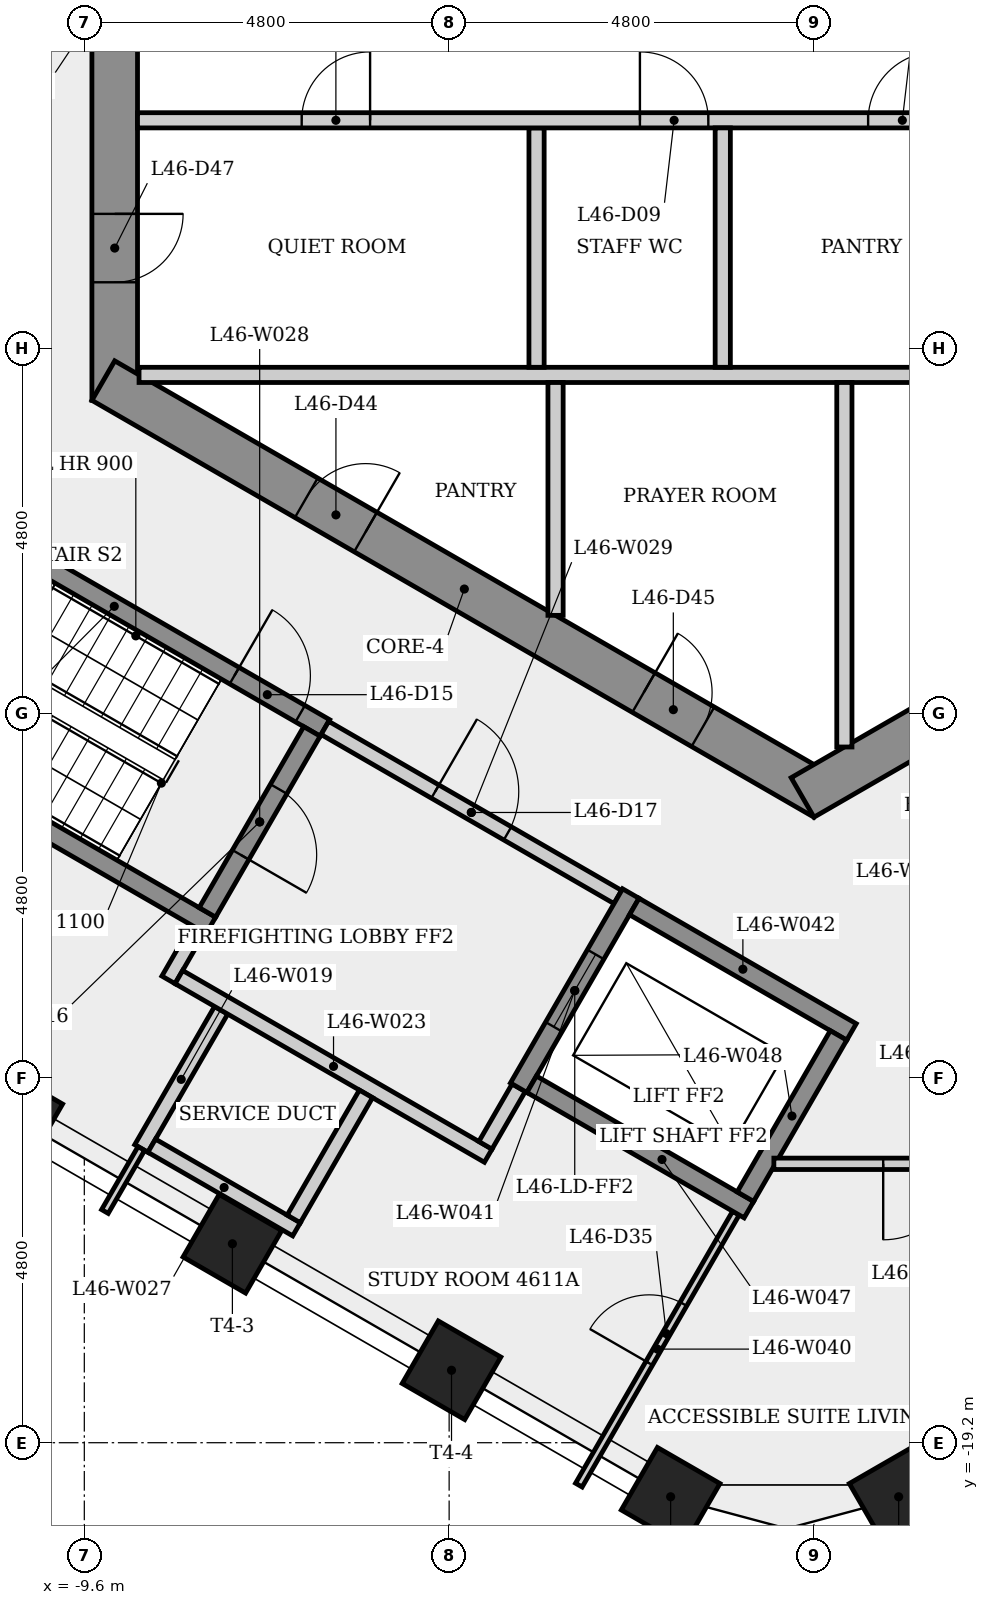
"""IFC4 building model, lengths in metres.
Left out: names, types, materials, properties, quantities, classifications, styles, units other than length and angle.
Written with IfcOpenShell. Run it as: python <this file> out.ifc"""

import sys

from ifc_helpers import new_model, si_unit, direction, frame, frame_2d, origin, origin_2d, place, context, subcontext, project, spatial, rectangle, extrude, element, fill, save


model = new_model("IFC4")
c1 = context("Model", 3, precision=1e-05, world=origin(), true_north=direction((0.0, 1.0)))
c2 = subcontext(c1, "Body", "Model", "MODEL_VIEW")
j1 = project(units=[si_unit("LENGTHUNIT", "METRE"), si_unit("PLANEANGLEUNIT", "RADIAN")], contexts=[c1])
p1 = place(None, origin())
s1 = spatial("IfcSite", under=j1, at=p1, CompositionType="ELEMENT")
p2 = place(p1, origin())
s2 = spatial("IfcBuilding", under=s1, at=p2, CompositionType="ELEMENT")
p3 = place(p2, frame((0.0, 0.0, 173.1)))
s3 = spatial("IfcBuildingStorey", under=s2, at=p3, CompositionType="ELEMENT", Elevation=173.1)
p4 = place(p3, frame((-9.2, 5.485, 0.0), z_axis=(0.0, 0.0, 1.0), x_axis=(0.0, -1.0, 0.0)))
e1 = element("IfcWall", 1, at=p4, inside=s3, PredefinedType="SHEAR", context=c2, shape_type="SweptSolid", body=[
    extrude(rectangle(XDim=10.97, YDim=0.6, at=frame_2d((5.485, 0.0))), origin(), (0.0, 0.0, 1.0), 3.4),
])
p5 = place(p4, frame((8.516, 0.0, 0.0)))
e2 = element("IfcOpeningElement", 2, at=p5, cuts=e1, PredefinedType="OPENING", context=c2, shape_type="SweptSolid", body=[
    extrude(rectangle(XDim=0.9, YDim=2.1, at=frame_2d((0.45, 1.05))), frame((0.0, 0.31, 0.0), z_axis=(0.0, -1.0, 0.0), x_axis=(1.0, 0.0, 0.0)), (0.0, 0.0, 1.0), 0.62),
])
p6 = place(p4, frame((4.685, 0.0, 0.0)))
e3 = element("IfcOpeningElement", 3, at=p6, cuts=e1, PredefinedType="OPENING", context=c2, shape_type="SweptSolid", body=[
    extrude(rectangle(XDim=1.6, YDim=2.1, at=frame_2d((0.8, 1.05))), frame((0.0, 0.31, 0.0), z_axis=(0.0, -1.0, 0.0), x_axis=(1.0, 0.0, 0.0)), (0.0, 0.0, 1.0), 0.62),
])
p7 = place(p3, frame((-9.35, -5.225, 0.0), z_axis=(0.0, 0.0, 1.0), x_axis=(0.866023993627, -0.500002442456, 0.0)))
e4 = element("IfcWall", 4, at=p7, inside=s3, PredefinedType="SHEAR", context=c2, shape_type="SweptSolid", body=[
    extrude(rectangle(XDim=10.97, YDim=0.6, at=frame_2d((5.485, 0.0))), origin(), (0.0, 0.0, 1.0), 3.4),
])
p8 = place(p7, frame((3.084, 0.0, 0.0)))
e5 = element("IfcOpeningElement", 5, at=p8, cuts=e4, PredefinedType="OPENING", context=c2, shape_type="SweptSolid", body=[
    extrude(rectangle(XDim=0.9, YDim=2.1, at=frame_2d((0.45, 1.05))), frame((0.0, 0.31, 0.0), z_axis=(0.0, -1.0, 0.0), x_axis=(1.0, 0.0, 0.0)), (0.0, 0.0, 1.0), 0.62),
])
p9 = place(p7, frame((8.21, 0.0, 0.0)))
e6 = element("IfcOpeningElement", 6, at=p9, cuts=e4, PredefinedType="OPENING", context=c2, shape_type="SweptSolid", body=[
    extrude(rectangle(XDim=0.9, YDim=2.1, at=frame_2d((0.45, 1.05))), frame((0.0, 0.31, 0.0), z_axis=(0.0, -1.0, 0.0), x_axis=(1.0, 0.0, 0.0)), (0.0, 0.0, 1.0), 0.62),
])
p10 = place(p3, frame((-0.15, -10.71, 0.0), z_axis=(0.0, 0.0, 1.0), x_axis=(0.866023993627, 0.500002442456, 0.0)))
e7 = element("IfcWall", 7, at=p10, inside=s3, PredefinedType="SHEAR", context=c2, shape_type="SweptSolid", body=[
    extrude(rectangle(XDim=10.97, YDim=0.6, at=frame_2d((5.485, 0.0))), origin(), (0.0, 0.0, 1.0), 3.4),
])
p11 = place(p10, frame((6.935, 0.0, 0.0)))
e8 = element("IfcOpeningElement", 8, at=p11, cuts=e7, PredefinedType="OPENING", context=c2, shape_type="SweptSolid", body=[
    extrude(rectangle(XDim=0.9, YDim=2.1, at=frame_2d((0.45, 1.05))), frame((0.0, 0.31, 0.0), z_axis=(0.0, -1.0, 0.0), x_axis=(1.0, 0.0, 0.0)), (0.0, 0.0, 1.0), 0.62),
])
for number, where, z_axis, x_axis in (
    (9, (-10.535, -14.918, 0.0), (0.0, 0.0, 1.0), (-0.5, -0.866, 0.0)),
    (10, (-7.652, -16.582, 0.0), (0.0, 0.0, 1.0), (-0.5, -0.866, 0.0)),
    (11, (-4.769, -18.247, 0.0), (0.0, 0.0, 1.0), (-0.5, -0.866, 0.0)),
    (12, (-1.886, -19.911, 0.0), (0.0, 0.0, 1.0), (-0.5, -0.866, 0.0)),
    (13, (1.114, -19.911, 0.0), (0.0, 0.0, 1.0), (0.5, -0.866, 0.0)),
):
    element("IfcColumn", number, at=place(p3, frame(where, z_axis=z_axis, x_axis=x_axis)), inside=s3, PredefinedType="COLUMN", context=c2, shape_type="SweptSolid", body=[
        extrude(rectangle(XDim=0.95, YDim=0.95, at=origin_2d()), origin(), (0.0, 0.0, 1.0), 3.4),
    ])
p12 = place(p3, frame((-11.977, -6.595, 0.0), z_axis=(0.0, 0.0, 1.0), x_axis=(0.866025499775, -0.499999833739, 0.0)))
e14 = element("IfcWall", 14, at=p12, inside=s3, PredefinedType="SHEAR", context=c2, shape_type="SweptSolid", body=[
    extrude(rectangle(XDim=6.4, YDim=0.25, at=frame_2d((3.2, 0.0))), origin(), (0.0, 0.0, 1.0), 3.05),
])
p13 = place(p12, frame((5.025, 0.0, 0.0)))
e15 = element("IfcOpeningElement", 15, at=p13, cuts=e14, PredefinedType="OPENING", context=c2, shape_type="SweptSolid", body=[
    extrude(rectangle(XDim=1.0, YDim=2.1, at=frame_2d((0.5, 1.05))), frame((0.0, 0.135, 0.0), z_axis=(0.0, -1.0, 0.0), x_axis=(1.0, 0.0, 0.0)), (0.0, 0.0, 1.0), 0.27),
])
p14 = place(p3, frame((-8.88, -5.15, 0.0), z_axis=(0.0, 0.0, 1.0), x_axis=(1.0, 0.0, 0.0)))
e16 = element("IfcWall", 16, at=p14, inside=s3, PredefinedType="PARTITIONING", context=c2, shape_type="SweptSolid", body=[
    extrude(rectangle(XDim=11.205, YDim=0.2, at=frame_2d((5.603, 0.0))), origin(), (0.0, 0.0, 1.0), 3.05),
])
p15 = place(p3, frame((-8.85, -15.329, 0.0), z_axis=(0.0, 0.0, 1.0), x_axis=(0.500027713859, 0.866009402589, 0.0)))
e17 = element("IfcWall", 17, at=p15, inside=s3, PredefinedType="PLUMBINGWALL", context=c2, shape_type="SweptSolid", body=[
    extrude(rectangle(XDim=2.1, YDim=0.2, at=frame_2d((1.05, 0.0))), origin(), (0.0, 0.0, 1.0), 3.05),
])
p16 = place(p3, frame((-8.493, -13.11, 0.0), z_axis=(0.0, 0.0, 1.0), x_axis=(0.500067724834, 0.865986299303, 0.0)))
e18 = element("IfcWall", 18, at=p16, inside=s3, PredefinedType="PARTITIONING", context=c2, shape_type="SweptSolid", body=[
    extrude(rectangle(XDim=0.775, YDim=0.2, at=frame_2d((0.388, 0.0))), origin(), (0.0, 0.0, 1.0), 3.05),
])
p17 = place(p3, frame((-7.935, -12.393, 0.0), z_axis=(0.0, 0.0, 1.0), x_axis=(-0.866025499775, 0.499999833739, 0.0)))
e19 = element("IfcWall", 19, at=p17, inside=s3, PredefinedType="SHEAR", context=c2, shape_type="SweptSolid", body=[
    extrude(rectangle(XDim=6.4, YDim=0.25, at=frame_2d((3.2, 0.0))), origin(), (0.0, 0.0, 1.0), 3.05),
])
p18 = place(p3, frame((-9.329, -16.158, 0.0), z_axis=(0.0, 0.0, 1.0), x_axis=(0.499950501706, 0.866053979752, 0.0)))
e20 = element("IfcWall", 20, at=p18, inside=s3, PredefinedType="PARTITIONING", context=c2, shape_type="SweptSolid", body=[
    extrude(rectangle(XDim=0.958, YDim=0.1, at=frame_2d((0.479, 0.0))), origin(), (0.0, 0.0, 1.0), 3.05),
])
p19 = place(p3, frame((-8.356, -13.073, 0.0), z_axis=(0.0, 0.0, 1.0), x_axis=(0.866038532462, -0.499977259774, 0.0)))
e21 = element("IfcWall", 21, at=p19, inside=s3, PredefinedType="PARTITIONING", context=c2, shape_type="SweptSolid", body=[
    extrude(rectangle(XDim=4.7, YDim=0.2, at=frame_2d((2.35, 0.0))), origin(), (0.0, 0.0, 1.0), 3.05),
])
p20 = place(p3, frame((-6.808, -16.392, 0.0), z_axis=(0.0, 0.0, 1.0), x_axis=(-0.866008176907, 0.50002983664, 0.0)))
e22 = element("IfcWall", 22, at=p20, inside=s3, PredefinedType="PLUMBINGWALL", context=c2, shape_type="SweptSolid", body=[
    extrude(rectangle(XDim=2.2, YDim=0.2, at=frame_2d((1.1, 0.0))), origin(), (0.0, 0.0, 1.0), 3.05),
])
p21 = place(p3, frame((-6.605, -9.841, 0.0), z_axis=(0.0, 0.0, 1.0), x_axis=(-0.499996545922, -0.866027397988, 0.0)))
e23 = element("IfcWall", 23, at=p21, inside=s3, PredefinedType="SHEAR", context=c2, shape_type="SweptSolid", body=[
    extrude(rectangle(XDim=2.75, YDim=0.25, at=frame_2d((1.375, 0.0))), origin(), (0.0, 0.0, 1.0), 3.05),
])
p22 = place(p21, frame((0.875, 0.0, 0.0)))
e24 = element("IfcOpeningElement", 24, at=p22, cuts=e23, PredefinedType="OPENING", context=c2, shape_type="SweptSolid", body=[
    extrude(rectangle(XDim=1.0, YDim=2.1, at=frame_2d((0.5, 1.05))), frame((0.0, 0.135, 0.0), z_axis=(0.0, -1.0, 0.0), x_axis=(1.0, 0.0, 0.0)), (0.0, 0.0, 1.0), 0.27),
])
p23 = place(p3, frame((-6.435, -9.795, 0.0), z_axis=(0.0, 0.0, 1.0), x_axis=(0.866012907634, -0.500021643343, 0.0)))
e25 = element("IfcWall", 25, at=p23, inside=s3, PredefinedType="PARTITIONING", context=c2, shape_type="SweptSolid", body=[
    extrude(rectangle(XDim=4.45, YDim=0.2, at=frame_2d((2.225, 0.0))), origin(), (0.0, 0.0, 1.0), 3.05),
])
p24 = place(p23, frame((1.675, 0.0, 0.0)))
e26 = element("IfcOpeningElement", 26, at=p24, cuts=e25, PredefinedType="OPENING", context=c2, shape_type="SweptSolid", body=[
    extrude(rectangle(XDim=1.1, YDim=2.1, at=frame_2d((0.55, 1.05))), frame((0.0, 0.11, 0.0), z_axis=(0.0, -1.0, 0.0), x_axis=(1.0, 0.0, 0.0)), (0.0, 0.0, 1.0), 0.22),
])
p25 = place(p3, frame((-5.895, -14.61, 0.0), z_axis=(0.0, 0.0, 1.0), x_axis=(-0.500022797313, -0.86601224135, 0.0)))
e27 = element("IfcWall", 27, at=p25, inside=s3, PredefinedType="PLUMBINGWALL", context=c2, shape_type="SweptSolid", body=[
    extrude(rectangle(XDim=1.9, YDim=0.2, at=frame_2d((0.95, 0.0))), origin(), (0.0, 0.0, 1.0), 3.05),
])
p26 = place(p3, frame((-3.885, -14.529, 0.0), z_axis=(0.0, 0.0, 1.0), x_axis=(-0.499859285417, -0.866106630146, 0.0)))
e28 = element("IfcWall", 28, at=p26, inside=s3, PredefinedType="PARTITIONING", context=c2, shape_type="SweptSolid", body=[
    extrude(rectangle(XDim=0.875, YDim=0.2, at=frame_2d((0.438, 0.0))), origin(), (0.0, 0.0, 1.0), 3.05),
])
p27 = place(p3, frame((-3.65, -1.9, 0.0), z_axis=(0.0, 0.0, 1.0), x_axis=(0.0, -1.0, 0.0)))
e29 = element("IfcWall", 29, at=p27, inside=s3, PredefinedType="PARTITIONING", context=c2, shape_type="SweptSolid", body=[
    extrude(rectangle(XDim=3.15, YDim=0.2, at=frame_2d((1.575, 0.0))), origin(), (0.0, 0.0, 1.0), 3.05),
])
p28 = place(p3, frame((-8.9, -1.8, 0.0), z_axis=(0.0, 0.0, 1.0), x_axis=(1.0, 0.0, 0.0)))
e30 = element("IfcWall", 30, at=p28, inside=s3, PredefinedType="PARTITIONING", context=c2, shape_type="SweptSolid", body=[
    extrude(rectangle(XDim=11.225, YDim=0.2, at=frame_2d((5.613, 0.0))), origin(), (0.0, 0.0, 1.0), 3.05),
])
p29 = place(p28, frame((2.16, 0.0, 0.0)))
e31 = element("IfcOpeningElement", 31, at=p29, cuts=e30, PredefinedType="OPENING", context=c2, shape_type="SweptSolid", body=[
    extrude(rectangle(XDim=0.9, YDim=2.1, at=frame_2d((0.45, 1.05))), frame((0.0, 0.11, 0.0), z_axis=(0.0, -1.0, 0.0), x_axis=(1.0, 0.0, 0.0)), (0.0, 0.0, 1.0), 0.22),
])
p30 = place(p28, frame((6.61, 0.0, 0.0)))
e32 = element("IfcOpeningElement", 32, at=p30, cuts=e30, PredefinedType="OPENING", context=c2, shape_type="SweptSolid", body=[
    extrude(rectangle(XDim=0.9, YDim=2.1, at=frame_2d((0.45, 1.05))), frame((0.0, 0.11, 0.0), z_axis=(0.0, -1.0, 0.0), x_axis=(1.0, 0.0, 0.0)), (0.0, 0.0, 1.0), 0.22),
])
p31 = place(p28, frame((9.613, 0.0, 0.0)))
e33 = element("IfcOpeningElement", 33, at=p31, cuts=e30, PredefinedType="OPENING", context=c2, shape_type="SweptSolid", body=[
    extrude(rectangle(XDim=0.9, YDim=2.1, at=frame_2d((0.45, 1.05))), frame((0.0, 0.11, 0.0), z_axis=(0.0, -1.0, 0.0), x_axis=(1.0, 0.0, 0.0)), (0.0, 0.0, 1.0), 0.22),
])
p32 = place(p3, frame((-3.4, -5.25, 0.0), z_axis=(0.0, 0.0, 1.0), x_axis=(0.0, -1.0, 0.0)))
e34 = element("IfcWall", 34, at=p32, inside=s3, PredefinedType="PARTITIONING", context=c2, shape_type="SweptSolid", body=[
    extrude(rectangle(XDim=3.064, YDim=0.2, at=frame_2d((1.532, 0.0))), origin(), (0.0, 0.0, 1.0), 3.05),
])
p33 = place(p3, frame((-3.094, -19.758, 0.0), z_axis=(0.0, 0.0, 1.0), x_axis=(0.500027577057, 0.866009481578, 0.0)))
e35 = element("IfcWall", 35, at=p33, inside=s3, PredefinedType="PARTITIONING", context=c2, shape_type="SweptSolid", body=[
    extrude(rectangle(XDim=4.133, YDim=0.1, at=frame_2d((2.066, 0.0))), origin(), (0.0, 0.0, 1.0), 3.05),
])
p34 = place(p33, frame((1.852, 0.0, 0.0)))
e36 = element("IfcOpeningElement", 36, at=p34, cuts=e35, PredefinedType="OPENING", context=c2, shape_type="SweptSolid", body=[
    extrude(rectangle(XDim=0.9, YDim=2.1, at=frame_2d((0.45, 1.05))), frame((0.0, 0.06, 0.0), z_axis=(0.0, -1.0, 0.0), x_axis=(1.0, 0.0, 0.0)), (0.0, 0.0, 1.0), 0.12),
])
p35 = place(p3, frame((-2.41, -11.974, 0.0), z_axis=(0.0, 0.0, 1.0), x_axis=(-0.500001826776, -0.866024349092, 0.0)))
e37 = element("IfcWall", 37, at=p35, inside=s3, PredefinedType="SHEAR", context=c2, shape_type="SweptSolid", body=[
    extrude(rectangle(XDim=2.95, YDim=0.25, at=frame_2d((1.475, 0.0))), origin(), (0.0, 0.0, 1.0), 3.05),
])
p36 = place(p35, frame((0.925, 0.0, 0.0)))
e38 = element("IfcOpeningElement", 38, at=p36, cuts=e37, PredefinedType="OPENING", context=c2, shape_type="SweptSolid", body=[
    extrude(rectangle(XDim=1.1, YDim=2.1, at=frame_2d((0.55, 1.05))), frame((0.0, 0.135, 0.0), z_axis=(0.0, -1.0, 0.0), x_axis=(1.0, 0.0, 0.0)), (0.0, 0.0, 1.0), 0.27),
])
p37 = place(p3, frame((-2.364, -12.145, 0.0), z_axis=(0.0, 0.0, 1.0), x_axis=(0.866040211805, -0.499974350878, 0.0)))
e39 = element("IfcWall", 39, at=p37, inside=s3, PredefinedType="SHEAR", context=c2, shape_type="SweptSolid", body=[
    extrude(rectangle(XDim=3.3, YDim=0.25, at=frame_2d((1.65, 0.0))), origin(), (0.0, 0.0, 1.0), 3.05),
])
p38 = place(p3, frame((-1.2, -1.9, 0.0), z_axis=(0.0, 0.0, 1.0), x_axis=(0.0, -1.0, 0.0)))
e40 = element("IfcWall", 40, at=p38, inside=s3, PredefinedType="PARTITIONING", context=c2, shape_type="SweptSolid", body=[
    extrude(rectangle(XDim=3.15, YDim=0.2, at=frame_2d((1.575, 0.0))), origin(), (0.0, 0.0, 1.0), 3.05),
])
p39 = place(p3, frame((-0.856, -16.133, 0.0), z_axis=(0.0, 0.0, 1.0), x_axis=(-0.866021716278, 0.500006386895, 0.0)))
e41 = element("IfcWall", 41, at=p39, inside=s3, PredefinedType="SHEAR", context=c2, shape_type="SweptSolid", body=[
    extrude(rectangle(XDim=3.3, YDim=0.25, at=frame_2d((1.65, 0.0))), origin(), (0.0, 0.0, 1.0), 3.05),
])
p40 = place(p3, frame((-0.902, -15.962, 0.0), z_axis=(0.0, 0.0, 1.0), x_axis=(0.500061746146, 0.865989751695, 0.0)))
e42 = element("IfcWall", 42, at=p40, inside=s3, PredefinedType="SHEAR", context=c2, shape_type="SweptSolid", body=[
    extrude(rectangle(XDim=2.45, YDim=0.25, at=frame_2d((1.225, 0.0))), origin(), (0.0, 0.0, 1.0), 3.4),
])
p41 = place(p3, frame((0.4, -5.25, 0.0), z_axis=(0.0, 0.0, 1.0), x_axis=(0.0, -1.0, 0.0)))
e43 = element("IfcWall", 43, at=p41, inside=s3, PredefinedType="PARTITIONING", context=c2, shape_type="SweptSolid", body=[
    extrude(rectangle(XDim=4.796, YDim=0.2, at=frame_2d((2.398, 0.0))), origin(), (0.0, 0.0, 1.0), 3.05),
])
p42 = place(p3, frame((3.349, -15.53, 0.0), z_axis=(0.0, 0.0, 1.0), x_axis=(-1.0, 0.0, 0.0)))
e44 = element("IfcWall", 44, at=p42, inside=s3, PredefinedType="PARTITIONING", context=c2, shape_type="SweptSolid", body=[
    extrude(rectangle(XDim=3.876, YDim=0.15, at=frame_2d((1.938, 0.0))), origin(), (0.0, 0.0, 1.0), 3.05),
])
p43 = place(p42, frame((1.438, 0.0, 0.0)))
e45 = element("IfcOpeningElement", 45, at=p43, cuts=e44, PredefinedType="OPENING", context=c2, shape_type="SweptSolid", body=[
    extrude(rectangle(XDim=1.0, YDim=2.1, at=frame_2d((0.5, 1.05))), frame((0.0, 0.085, 0.0), z_axis=(0.0, -1.0, 0.0), x_axis=(1.0, 0.0, 0.0)), (0.0, 0.0, 1.0), 0.17),
])
p44 = place(p29, origin())
e46 = element("IfcDoor", 46, at=p44, inside=s3, OperationType="SINGLE_SWING_RIGHT", PredefinedType="DOOR", context=c2, shape_type="SweptSolid", body=[
    extrude(rectangle(XDim=0.9, YDim=2.1, at=frame_2d((0.45, 1.05))), frame((0.0, 0.025, 0.0), z_axis=(0.0, -1.0, 0.0), x_axis=(1.0, 0.0, 0.0)), (0.0, 0.0, 1.0), 0.05),
])
fill(e31, e46)
p45 = place(p30, origin())
e47 = element("IfcDoor", 47, at=p45, inside=s3, OperationType="SINGLE_SWING_LEFT", PredefinedType="DOOR", context=c2, shape_type="SweptSolid", body=[
    extrude(rectangle(XDim=0.9, YDim=2.1, at=frame_2d((0.45, 1.05))), frame((0.0, 0.025, 0.0), z_axis=(0.0, -1.0, 0.0), x_axis=(1.0, 0.0, 0.0)), (0.0, 0.0, 1.0), 0.05),
])
fill(e32, e47)
p46 = place(p31, origin())
e48 = element("IfcDoor", 48, at=p46, inside=s3, OperationType="SINGLE_SWING_RIGHT", PredefinedType="DOOR", context=c2, shape_type="SweptSolid", body=[
    extrude(rectangle(XDim=0.9, YDim=2.1, at=frame_2d((0.45, 1.05))), frame((0.0, 0.025, 0.0), z_axis=(0.0, -1.0, 0.0), x_axis=(1.0, 0.0, 0.0)), (0.0, 0.0, 1.0), 0.05),
])
fill(e33, e48)
p47 = place(p13, origin())
e49 = element("IfcDoor", 49, at=p47, inside=s3, OperationType="SINGLE_SWING_LEFT", PredefinedType="DOOR", context=c2, shape_type="SweptSolid", body=[
    extrude(rectangle(XDim=1.0, YDim=2.1, at=frame_2d((0.5, 1.05))), frame((0.0, 0.025, 0.0), z_axis=(0.0, -1.0, 0.0), x_axis=(1.0, 0.0, 0.0)), (0.0, 0.0, 1.0), 0.05),
])
fill(e15, e49)
p48 = place(p22, origin())
e50 = element("IfcDoor", 50, at=p48, inside=s3, OperationType="SINGLE_SWING_RIGHT", PredefinedType="DOOR", context=c2, shape_type="SweptSolid", body=[
    extrude(rectangle(XDim=1.0, YDim=2.1, at=frame_2d((0.5, 1.05))), frame((0.0, 0.025, 0.0), z_axis=(0.0, -1.0, 0.0), x_axis=(1.0, 0.0, 0.0)), (0.0, 0.0, 1.0), 0.05),
])
fill(e24, e50)
p49 = place(p24, origin())
e51 = element("IfcDoor", 51, at=p49, inside=s3, OperationType="SINGLE_SWING_LEFT", PredefinedType="DOOR", context=c2, shape_type="SweptSolid", body=[
    extrude(rectangle(XDim=1.1, YDim=2.1, at=frame_2d((0.55, 1.05))), frame((0.0, 0.025, 0.0), z_axis=(0.0, -1.0, 0.0), x_axis=(1.0, 0.0, 0.0)), (0.0, 0.0, 1.0), 0.05),
])
fill(e26, e51)
p50 = place(p36, origin())
e52 = element("IfcDoor", 52, at=p50, inside=s3, OperationType="SLIDING_TO_LEFT", PredefinedType="DOOR", context=c2, shape_type="SweptSolid", body=[
    extrude(rectangle(XDim=1.1, YDim=2.1, at=frame_2d((0.55, 1.05))), frame((0.0, 0.025, 0.0), z_axis=(0.0, -1.0, 0.0), x_axis=(1.0, 0.0, 0.0)), (0.0, 0.0, 1.0), 0.05),
])
fill(e38, e52)
p51 = place(p43, origin())
e53 = element("IfcDoor", 53, at=p51, inside=s3, OperationType="SINGLE_SWING_RIGHT", PredefinedType="DOOR", context=c2, shape_type="SweptSolid", body=[
    extrude(rectangle(XDim=1.0, YDim=2.1, at=frame_2d((0.5, 1.05))), frame((0.0, 0.025, 0.0), z_axis=(0.0, -1.0, 0.0), x_axis=(1.0, 0.0, 0.0)), (0.0, 0.0, 1.0), 0.05),
])
fill(e45, e53)
p52 = place(p34, origin())
e54 = element("IfcDoor", 54, at=p52, inside=s3, OperationType="SINGLE_SWING_LEFT", PredefinedType="DOOR", context=c2, shape_type="SweptSolid", body=[
    extrude(rectangle(XDim=0.9, YDim=2.1, at=frame_2d((0.45, 1.05))), frame((0.0, 0.025, 0.0), z_axis=(0.0, -1.0, 0.0), x_axis=(1.0, 0.0, 0.0)), (0.0, 0.0, 1.0), 0.05),
])
fill(e36, e54)
p53 = place(p8, origin())
e55 = element("IfcDoor", 55, at=p53, inside=s3, OperationType="SINGLE_SWING_RIGHT", PredefinedType="DOOR", context=c2, shape_type="SweptSolid", body=[
    extrude(rectangle(XDim=0.9, YDim=2.1, at=frame_2d((0.45, 1.05))), frame((0.0, 0.025, 0.0), z_axis=(0.0, -1.0, 0.0), x_axis=(1.0, 0.0, 0.0)), (0.0, 0.0, 1.0), 0.05),
])
fill(e5, e55)
p54 = place(p9, origin())
e56 = element("IfcDoor", 56, at=p54, inside=s3, OperationType="SINGLE_SWING_LEFT", PredefinedType="DOOR", context=c2, shape_type="SweptSolid", body=[
    extrude(rectangle(XDim=0.9, YDim=2.1, at=frame_2d((0.45, 1.05))), frame((0.0, 0.025, 0.0), z_axis=(0.0, -1.0, 0.0), x_axis=(1.0, 0.0, 0.0)), (0.0, 0.0, 1.0), 0.05),
])
fill(e6, e56)
p55 = place(p5, origin())
e57 = element("IfcDoor", 57, at=p55, inside=s3, OperationType="SINGLE_SWING_LEFT", PredefinedType="DOOR", context=c2, shape_type="SweptSolid", body=[
    extrude(rectangle(XDim=0.9, YDim=2.1, at=frame_2d((0.45, 1.05))), frame((0.0, 0.025, 0.0), z_axis=(0.0, -1.0, 0.0), x_axis=(1.0, 0.0, 0.0)), (0.0, 0.0, 1.0), 0.05),
])
fill(e2, e57)
save(model, sys.argv[1])
